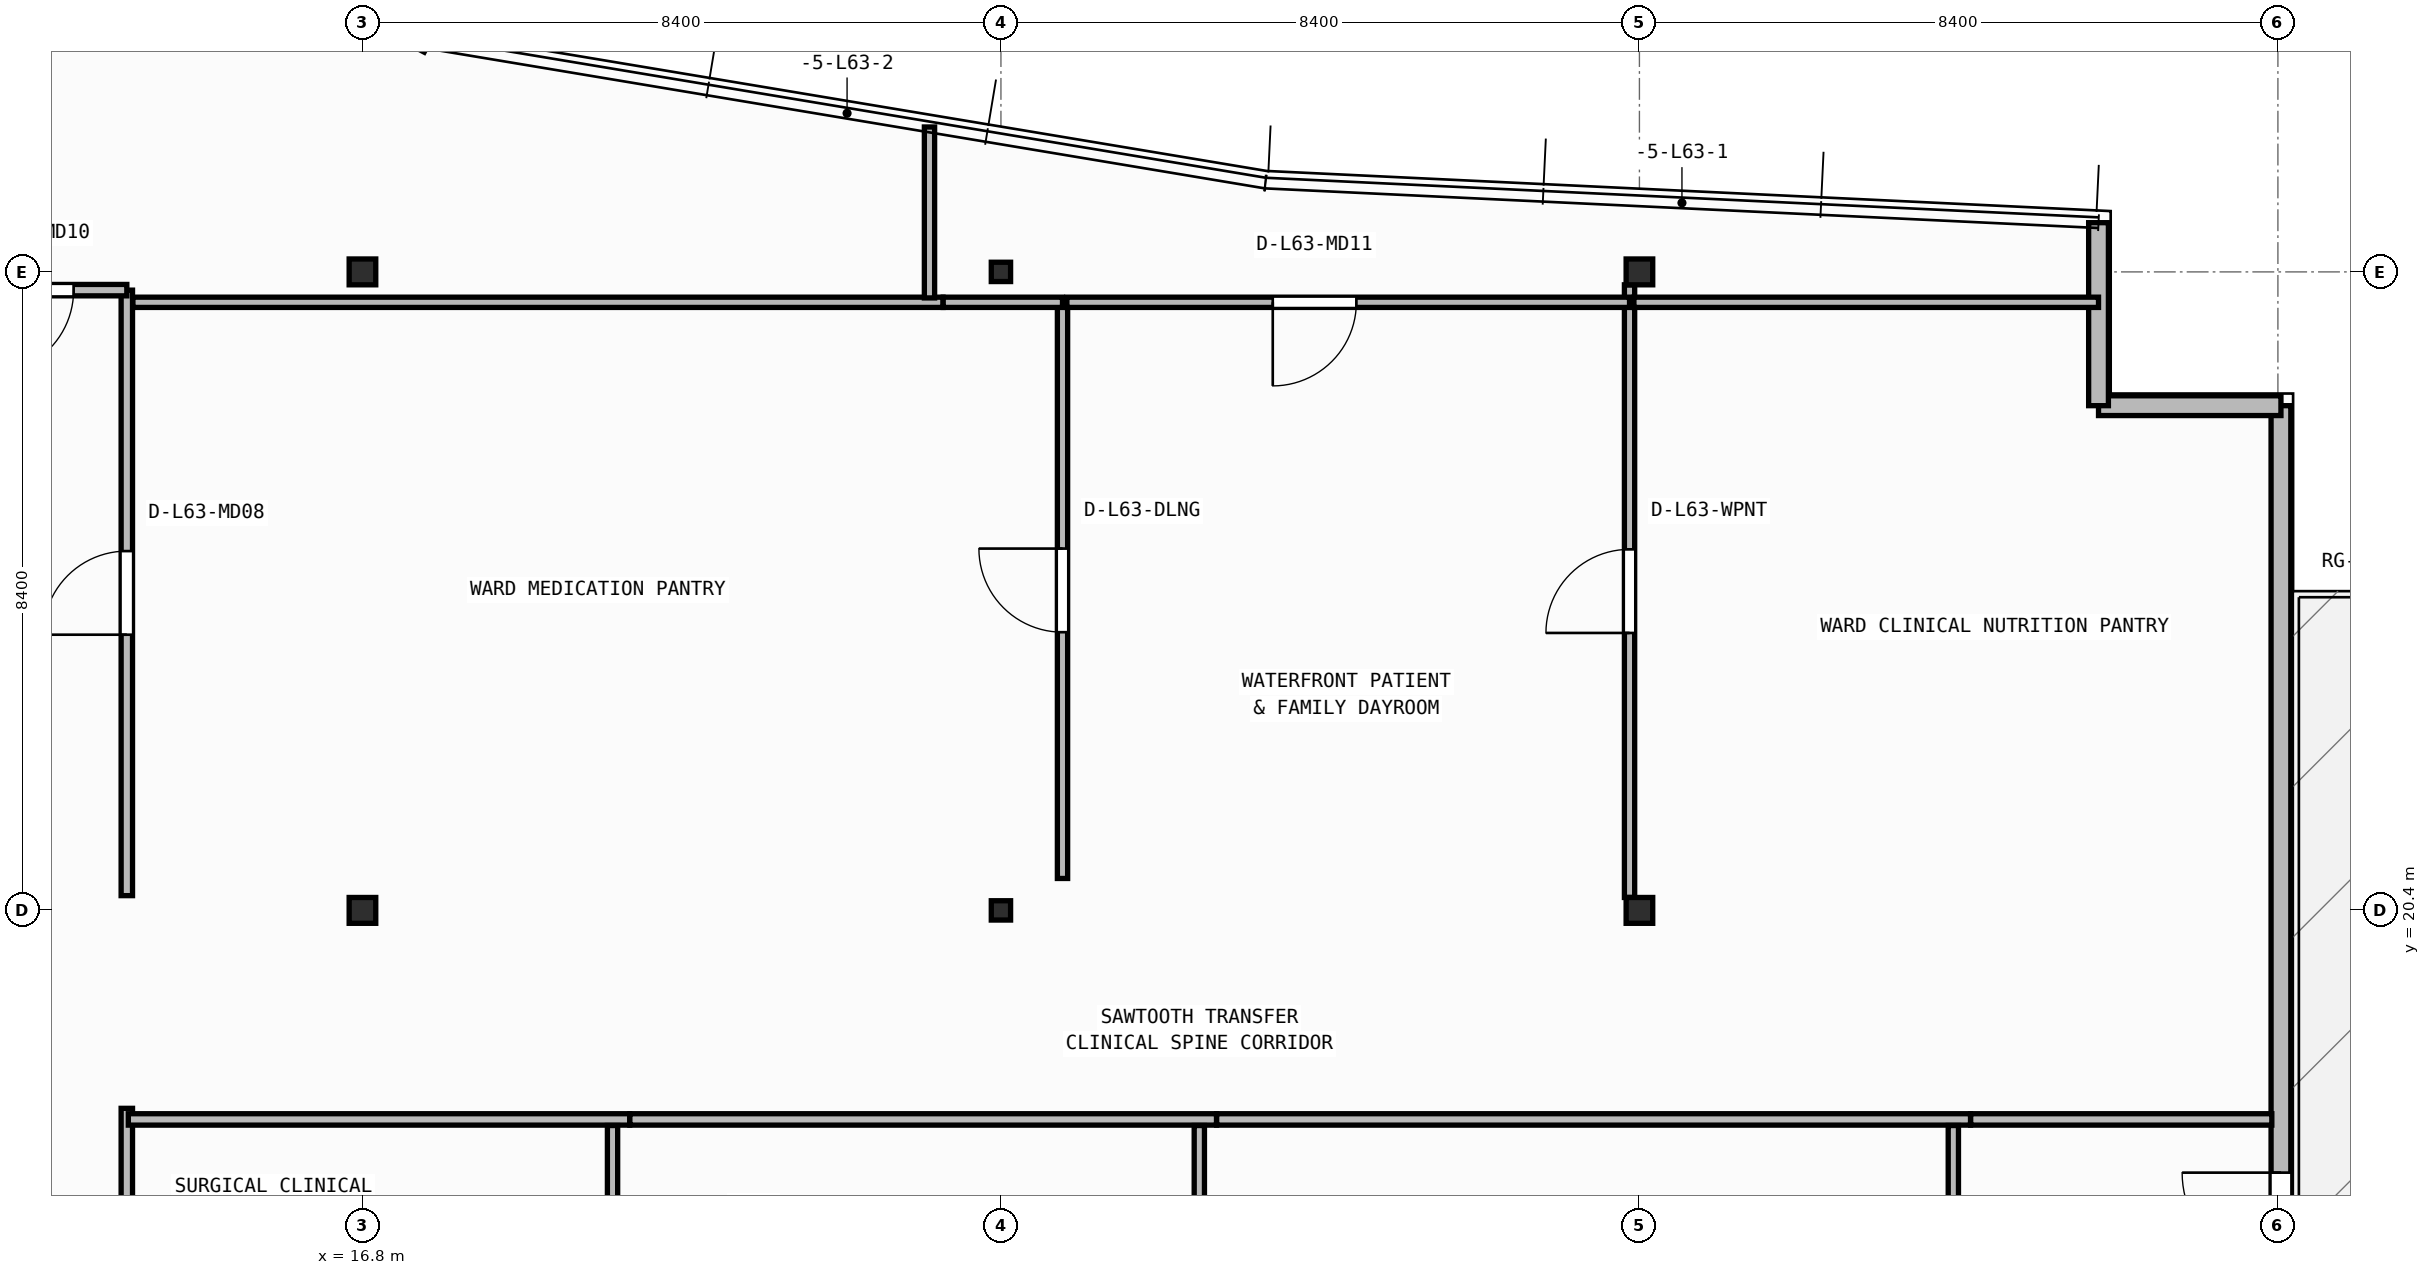
"""IFC4 building model, lengths in metres.
Left out: names, types, materials, properties, quantities, classifications, styles, units other than length and angle.
Written with IfcOpenShell. Run it as: python <this file> out.ifc"""

import sys

from ifc_helpers import new_model, si_unit, direction, frame, frame_2d, origin, origin_2d, place, context, subcontext, project, spatial, rectangle, i_section, extrude, element, fill, save


model = new_model("IFC4")
c1 = context("Model", 3, precision=1e-05, world=origin(), true_north=direction((0.0, 1.0)))
c2 = subcontext(c1, "Body", "Model", "MODEL_VIEW")
j1 = project(units=[si_unit("LENGTHUNIT", "METRE"), si_unit("PLANEANGLEUNIT", "RADIAN")], contexts=[c1])
p1 = place(None, origin())
s1 = spatial("IfcSite", under=j1, at=p1, CompositionType="ELEMENT")
p2 = place(p1, origin())
s2 = spatial("IfcBuilding", under=s1, at=p2, CompositionType="ELEMENT")
p3 = place(p2, frame((0.0, 0.0, 256.55)))
s3 = spatial("IfcBuildingStorey", under=s2, at=p3, CompositionType="ELEMENT", Elevation=256.55)
p4 = place(p3, frame((16.8, 20.4, 0.0), z_axis=(0.0, 0.0, 1.0), x_axis=(1.0, 0.0, 0.0)))
e1 = element("IfcColumn", 1, at=p4, inside=s3, PredefinedType="COLUMN", context=c2, shape_type="SweptSolid", body=[
    extrude(i_section(OverallWidth=0.35, OverallDepth=0.34, WebThickness=0.016, FlangeThickness=0.028, at=origin_2d()), origin(), (0.0, 0.0, 1.0), 3.95),
])
p5 = place(p3, frame((25.2, 20.4, 0.0), z_axis=(0.0, 0.0, 1.0), x_axis=(1.0, 0.0, 0.0)))
e2 = element("IfcColumn", 2, at=p5, inside=s3, PredefinedType="COLUMN", context=c2, shape_type="SweptSolid", body=[
    extrude(i_section(OverallWidth=0.254, OverallDepth=0.254, WebThickness=0.009, FlangeThickness=0.014, FilletRadius=0.013, at=origin_2d()), origin(), (0.0, 0.0, 1.0), 3.95),
])
for number, where, z_axis, x_axis in (
    (3, (33.6, 20.4, 0.0), (0.0, 0.0, 1.0), (1.0, 0.0, 0.0)),
    (4, (16.8, 28.8, 0.0), (0.0, 0.0, 1.0), (1.0, 0.0, 0.0)),
):
    element("IfcColumn", number, at=place(p3, frame(where, z_axis=z_axis, x_axis=x_axis)), inside=s3, PredefinedType="COLUMN", context=c2, shape_type="SweptSolid", body=[
        extrude(i_section(OverallWidth=0.35, OverallDepth=0.34, WebThickness=0.016, FlangeThickness=0.028, at=origin_2d()), origin(), (0.0, 0.0, 1.0), 3.95),
    ])
p6 = place(p3, frame((25.2, 28.8, 0.0), z_axis=(0.0, 0.0, 1.0), x_axis=(1.0, 0.0, 0.0)))
e5 = element("IfcColumn", 5, at=p6, inside=s3, PredefinedType="COLUMN", context=c2, shape_type="SweptSolid", body=[
    extrude(i_section(OverallWidth=0.254, OverallDepth=0.254, WebThickness=0.009, FlangeThickness=0.014, FilletRadius=0.013, at=origin_2d()), origin(), (0.0, 0.0, 1.0), 3.95),
])
p7 = place(p3, frame((33.6, 28.8, 0.0), z_axis=(0.0, 0.0, 1.0), x_axis=(1.0, 0.0, 0.0)))
e6 = element("IfcColumn", 6, at=p7, inside=s3, PredefinedType="COLUMN", context=c2, shape_type="SweptSolid", body=[
    extrude(i_section(OverallWidth=0.35, OverallDepth=0.34, WebThickness=0.016, FlangeThickness=0.028, at=origin_2d()), origin(), (0.0, 0.0, 1.0), 3.95),
])
p8 = place(p3, frame((42.04, 5.56, 0.0), z_axis=(0.0, 0.0, 1.0), x_axis=(0.0, 1.0, 0.0)))
e7 = element("IfcWall", 7, at=p8, inside=s3, PredefinedType="STANDARD", context=c2, shape_type="SweptSolid", body=[
    extrude(rectangle(XDim=21.48, YDim=0.26, at=frame_2d((10.74, 0.0))), origin(), (0.0, 0.0, 1.0), 3.71),
])
p9 = place(p8, frame((10.09, 0.0, 0.0)))
e8 = element("IfcOpeningElement", 8, at=p9, cuts=e7, PredefinedType="OPENING", context=c2, shape_type="SweptSolid", body=[
    extrude(rectangle(XDim=1.3, YDim=2.15, at=frame_2d((0.65, 1.075))), frame((0.0, 0.14, 0.0), z_axis=(0.0, -1.0, 0.0), x_axis=(1.0, 0.0, 0.0)), (0.0, 0.0, 1.0), 0.28),
])
p10 = place(p3, frame((42.04, 27.04, 0.0), z_axis=(0.0, 0.0, 1.0), x_axis=(-1.0, 0.0, 0.0)))
e9 = element("IfcWall", 9, at=p10, inside=s3, PredefinedType="STANDARD", context=c2, shape_type="SweptSolid", body=[
    extrude(rectangle(XDim=2.4, YDim=0.26, at=frame_2d((1.2, 0.0))), origin(), (0.0, 0.0, 1.0), 3.71),
])
p11 = place(p3, frame((39.64, 27.04, 0.0), z_axis=(0.0, 0.0, 1.0), x_axis=(0.0, 1.0, 0.0)))
e10 = element("IfcWall", 10, at=p11, inside=s3, PredefinedType="STANDARD", context=c2, shape_type="SweptSolid", body=[
    extrude(rectangle(XDim=2.407, YDim=0.26, at=frame_2d((1.204, 0.0))), origin(), (0.0, 0.0, 1.0), 3.71),
])
p12 = place(p3, frame((13.7, 14.7, 0.0), z_axis=(0.0, 0.0, 1.0), x_axis=(0.0, 1.0, 0.0)))
e11 = element("IfcWall", 11, at=p12, inside=s3, PredefinedType="PARTITIONING", context=c2, shape_type="SweptSolid", body=[
    extrude(rectangle(XDim=3.096, YDim=0.15, at=frame_2d((1.548, 0.0))), origin(), (0.0, 0.0, 1.0), 3.71),
])
p13 = place(p3, frame((13.7, 20.594, 0.0), z_axis=(0.0, 0.0, 1.0), x_axis=(0.0, 1.0, 0.0)))
e12 = element("IfcWall", 12, at=p13, inside=s3, PredefinedType="PARTITIONING", context=c2, shape_type="SweptSolid", body=[
    extrude(rectangle(XDim=7.966, YDim=0.15, at=frame_2d((3.983, 0.0))), origin(), (0.0, 0.0, 1.0), 3.71),
])
p14 = place(p13, frame((3.433, 0.0, 0.0)))
e13 = element("IfcOpeningElement", 13, at=p14, cuts=e12, PredefinedType="OPENING", context=c2, shape_type="SweptSolid", body=[
    extrude(rectangle(XDim=1.1, YDim=2.1, at=frame_2d((0.55, 1.05))), frame((0.0, 0.085, 0.0), z_axis=(0.0, -1.0, 0.0), x_axis=(1.0, 0.0, 0.0)), (0.0, 0.0, 1.0), 0.17),
])
p15 = place(p3, frame((13.7, 28.56, 0.0), z_axis=(0.0, 0.0, 1.0), x_axis=(-1.0, 0.0, 0.0)))
e14 = element("IfcWall", 14, at=p15, inside=s3, PredefinedType="PARTITIONING", context=c2, shape_type="SweptSolid", body=[
    extrude(rectangle(XDim=2.5, YDim=0.15, at=frame_2d((1.25, 0.0))), origin(), (0.0, 0.0, 1.0), 3.157),
])
p16 = place(p15, frame((0.7, 0.0, 0.0)))
e15 = element("IfcOpeningElement", 15, at=p16, cuts=e14, PredefinedType="OPENING", context=c2, shape_type="SweptSolid", body=[
    extrude(rectangle(XDim=1.1, YDim=2.1, at=frame_2d((0.55, 1.05))), frame((0.0, 0.085, 0.0), z_axis=(0.0, -1.0, 0.0), x_axis=(1.0, 0.0, 0.0)), (0.0, 0.0, 1.0), 0.17),
])
p17 = place(p3, frame((13.72, 17.65, 0.0), z_axis=(0.0, 0.0, 1.0), x_axis=(1.0, 0.0, 0.0)))
e16 = element("IfcWall", 16, at=p17, inside=s3, PredefinedType="PARTITIONING", context=c2, shape_type="SweptSolid", body=[
    extrude(rectangle(XDim=6.596, YDim=0.15, at=frame_2d((3.298, 0.0))), origin(), (0.0, 0.0, 1.0), 3.71),
])
p18 = place(p3, frame((20.318, 17.65, 0.0), z_axis=(0.0, 0.0, 1.0), x_axis=(1.0, 0.0, 0.0)))
e17 = element("IfcWall", 17, at=p18, inside=s3, PredefinedType="PARTITIONING", context=c2, shape_type="SweptSolid", body=[
    extrude(rectangle(XDim=7.718, YDim=0.15, at=frame_2d((3.859, 0.0))), origin(), (0.0, 0.0, 1.0), 3.71),
])
p19 = place(p3, frame((28.038, 17.65, 0.0), z_axis=(0.0, 0.0, 1.0), x_axis=(1.0, 0.0, 0.0)))
e18 = element("IfcWall", 18, at=p19, inside=s3, PredefinedType="PARTITIONING", context=c2, shape_type="SweptSolid", body=[
    extrude(rectangle(XDim=9.918, YDim=0.15, at=frame_2d((4.959, 0.0))), origin(), (0.0, 0.0, 1.0), 3.71),
])
p20 = place(p3, frame((37.958, 17.65, 0.0), z_axis=(0.0, 0.0, 1.0), x_axis=(1.0, 0.0, 0.0)))
e19 = element("IfcWall", 19, at=p20, inside=s3, PredefinedType="PARTITIONING", context=c2, shape_type="SweptSolid", body=[
    extrude(rectangle(XDim=3.962, YDim=0.15, at=frame_2d((1.981, 0.0))), origin(), (0.0, 0.0, 1.0), 3.71),
])
for number, where, z_axis, x_axis in (
    (20, (20.09, 14.76, 0.0), (0.0, 0.0, 1.0), (0.0, 1.0, 0.0)),
    (21, (27.81, 14.76, 0.0), (0.0, 0.0, 1.0), (0.0, 1.0, 0.0)),
    (22, (37.73, 14.76, 0.0), (0.0, 0.0, 1.0), (0.0, 1.0, 0.0)),
):
    element("IfcWall", number, at=place(p3, frame(where, z_axis=z_axis, x_axis=x_axis)), inside=s3, PredefinedType="PARTITIONING", context=c2, shape_type="SweptSolid", body=[
        extrude(rectangle(XDim=2.81, YDim=0.135, at=frame_2d((1.405, 0.0))), origin(), (0.0, 0.0, 1.0), 3.71),
    ])
p21 = place(p3, frame((26.01, 20.82, 0.0), z_axis=(0.0, 0.0, 1.0), x_axis=(0.0, 1.0, 0.0)))
e23 = element("IfcWall", 23, at=p21, inside=s3, PredefinedType="PARTITIONING", context=c2, shape_type="SweptSolid", body=[
    extrude(rectangle(XDim=7.58, YDim=0.135, at=frame_2d((3.79, 0.0))), origin(), (0.0, 0.0, 1.0), 3.71),
])
p22 = place(p21, frame((3.24, 0.0, 0.0)))
e24 = element("IfcOpeningElement", 24, at=p22, cuts=e23, PredefinedType="OPENING", context=c2, shape_type="SweptSolid", body=[
    extrude(rectangle(XDim=1.1, YDim=2.1, at=frame_2d((0.55, 1.05))), frame((0.0, 0.077, 0.0), z_axis=(0.0, -1.0, 0.0), x_axis=(1.0, 0.0, 0.0)), (0.0, 0.0, 1.0), 0.155),
])
p23 = place(p3, frame((24.438, 28.4, 0.0), z_axis=(0.0, 0.0, 1.0), x_axis=(-1.0, 0.0, 0.0)))
e25 = element("IfcWall", 25, at=p23, inside=s3, PredefinedType="PARTITIONING", context=c2, shape_type="SweptSolid", body=[
    extrude(rectangle(XDim=10.658, YDim=0.135, at=frame_2d((5.329, 0.0))), origin(), (0.0, 0.0, 1.0), 3.157),
])
p24 = place(p3, frame((26.01, 28.4, 0.0), z_axis=(0.0, 0.0, 1.0), x_axis=(-1.0, 0.0, 0.0)))
e26 = element("IfcWall", 26, at=p24, inside=s3, PredefinedType="PARTITIONING", context=c2, shape_type="SweptSolid", body=[
    extrude(rectangle(XDim=1.57, YDim=0.135, at=frame_2d((0.785, 0.0))), origin(), (0.0, 0.0, 1.0), 3.326),
])
p25 = place(p3, frame((33.47, 20.57, 0.0), z_axis=(0.0, 0.0, 1.0), x_axis=(0.0, 1.0, 0.0)))
e27 = element("IfcWall", 27, at=p25, inside=s3, PredefinedType="PARTITIONING", context=c2, shape_type="SweptSolid", body=[
    extrude(rectangle(XDim=8.06, YDim=0.135, at=frame_2d((4.03, 0.0))), origin(), (0.0, 0.0, 1.0), 3.157),
])
p26 = place(p25, frame((3.48, 0.0, 0.0)))
e28 = element("IfcOpeningElement", 28, at=p26, cuts=e27, PredefinedType="OPENING", context=c2, shape_type="SweptSolid", body=[
    extrude(rectangle(XDim=1.1, YDim=2.1, at=frame_2d((0.55, 1.05))), frame((0.0, 0.077, 0.0), z_axis=(0.0, -1.0, 0.0), x_axis=(1.0, 0.0, 0.0)), (0.0, 0.0, 1.0), 0.155),
])
p27 = place(p3, frame((33.47, 28.4, 0.0), z_axis=(0.0, 0.0, 1.0), x_axis=(-1.0, 0.0, 0.0)))
e29 = element("IfcWall", 29, at=p27, inside=s3, PredefinedType="PARTITIONING", context=c2, shape_type="SweptSolid", body=[
    extrude(rectangle(XDim=7.403, YDim=0.135, at=frame_2d((3.701, 0.0))), origin(), (0.0, 0.0, 1.0), 3.326),
])
p28 = place(p27, frame((3.594, 0.0, 0.0)))
e30 = element("IfcOpeningElement", 30, at=p28, cuts=e29, PredefinedType="OPENING", context=c2, shape_type="SweptSolid", body=[
    extrude(rectangle(XDim=1.1, YDim=2.1, at=frame_2d((0.55, 1.05))), frame((0.0, 0.077, 0.0), z_axis=(0.0, -1.0, 0.0), x_axis=(1.0, 0.0, 0.0)), (0.0, 0.0, 1.0), 0.155),
])
p29 = place(p3, frame((39.64, 28.4, 0.0), z_axis=(0.0, 0.0, 1.0), x_axis=(-1.0, 0.0, 0.0)))
e31 = element("IfcWall", 31, at=p29, inside=s3, PredefinedType="PARTITIONING", context=c2, shape_type="SweptSolid", body=[
    extrude(rectangle(XDim=6.112, YDim=0.135, at=frame_2d((3.056, 0.0))), origin(), (0.0, 0.0, 1.0), 3.71),
])
p30 = place(p3, frame((24.26, 28.458, 0.0), z_axis=(0.0, 0.0, 1.0), x_axis=(0.0, 1.0, 0.0)))
e32 = element("IfcWall", 32, at=p30, inside=s3, PredefinedType="PARTITIONING", context=c2, shape_type="SweptSolid", body=[
    extrude(rectangle(XDim=2.249, YDim=0.135, at=frame_2d((1.125, 0.0))), origin(), (0.0, 0.0, 1.0), 3.71),
])
p31 = place(p9, origin())
e33 = element("IfcDoor", 33, at=p31, inside=s3, OperationType="SINGLE_SWING_RIGHT", PredefinedType="DOOR", context=c2, shape_type="SweptSolid", body=[
    extrude(rectangle(XDim=1.3, YDim=2.15, at=frame_2d((0.65, 1.075))), frame((0.0, 0.025, 0.0), z_axis=(0.0, -1.0, 0.0), x_axis=(1.0, 0.0, 0.0)), (0.0, 0.0, 1.0), 0.05),
])
fill(e8, e33)
p32 = place(p14, origin())
e34 = element("IfcDoor", 34, at=p32, inside=s3, OperationType="SINGLE_SWING_LEFT", PredefinedType="DOOR", context=c2, shape_type="SweptSolid", body=[
    extrude(rectangle(XDim=1.1, YDim=2.1, at=frame_2d((0.55, 1.05))), frame((0.0, 0.025, 0.0), z_axis=(0.0, -1.0, 0.0), x_axis=(1.0, 0.0, 0.0)), (0.0, 0.0, 1.0), 0.05),
])
fill(e13, e34)
p33 = place(p16, origin())
e35 = element("IfcDoor", 35, at=p33, inside=s3, OperationType="SINGLE_SWING_RIGHT", PredefinedType="DOOR", context=c2, shape_type="SweptSolid", body=[
    extrude(rectangle(XDim=1.1, YDim=2.1, at=frame_2d((0.55, 1.05))), frame((0.0, 0.025, 0.0), z_axis=(0.0, -1.0, 0.0), x_axis=(1.0, 0.0, 0.0)), (0.0, 0.0, 1.0), 0.05),
])
fill(e15, e35)
p34 = place(p22, origin())
e36 = element("IfcDoor", 36, at=p34, inside=s3, OperationType="SINGLE_SWING_RIGHT", PredefinedType="DOOR", context=c2, shape_type="SweptSolid", body=[
    extrude(rectangle(XDim=1.1, YDim=2.1, at=frame_2d((0.55, 1.05))), frame((0.0, 0.025, 0.0), z_axis=(0.0, -1.0, 0.0), x_axis=(1.0, 0.0, 0.0)), (0.0, 0.0, 1.0), 0.05),
])
fill(e24, e36)
p35 = place(p26, origin())
e37 = element("IfcDoor", 37, at=p35, inside=s3, OperationType="SINGLE_SWING_LEFT", PredefinedType="DOOR", context=c2, shape_type="SweptSolid", body=[
    extrude(rectangle(XDim=1.1, YDim=2.1, at=frame_2d((0.55, 1.05))), frame((0.0, 0.025, 0.0), z_axis=(0.0, -1.0, 0.0), x_axis=(1.0, 0.0, 0.0)), (0.0, 0.0, 1.0), 0.05),
])
fill(e28, e37)
p36 = place(p28, origin())
e38 = element("IfcDoor", 38, at=p36, inside=s3, OperationType="SINGLE_SWING_RIGHT", PredefinedType="DOOR", context=c2, shape_type="SweptSolid", body=[
    extrude(rectangle(XDim=1.1, YDim=2.1, at=frame_2d((0.55, 1.05))), frame((0.0, 0.025, 0.0), z_axis=(0.0, -1.0, 0.0), x_axis=(1.0, 0.0, 0.0)), (0.0, 0.0, 1.0), 0.05),
])
fill(e30, e38)
save(model, sys.argv[1])
